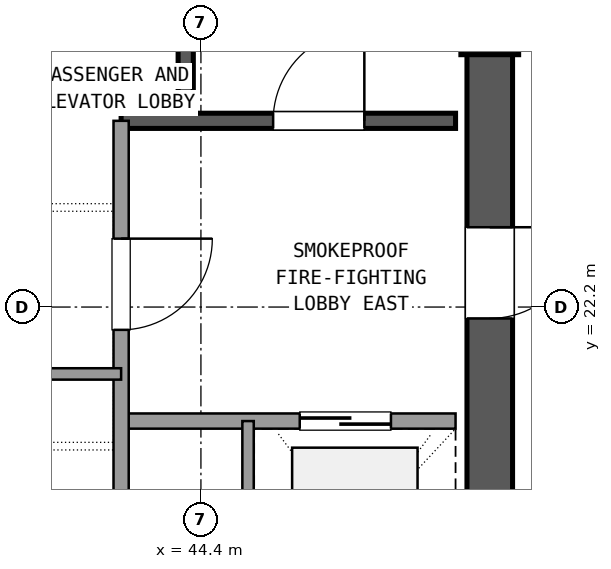
"""IFC4 building model, lengths in metres.
Left out: names, types, materials, properties, quantities, classifications, styles, units other than length and angle.
Written with IfcOpenShell. Run it as: python <this file> out.ifc"""

import sys

from ifc_helpers import new_model, si_unit, direction, frame, frame_2d, origin, origin_2d, place, context, subcontext, project, spatial, rectangle, extrude, element, fill, save


model = new_model("IFC4")
c1 = context("Model", 3, precision=1e-05, world=origin(), true_north=direction((0.0, 1.0)))
c2 = subcontext(c1, "Body", "Model", "MODEL_VIEW")
j1 = project(units=[si_unit("LENGTHUNIT", "METRE"), si_unit("PLANEANGLEUNIT", "RADIAN")], contexts=[c1])
p1 = place(None, origin())
s1 = spatial("IfcSite", under=j1, at=p1, CompositionType="ELEMENT")
p2 = place(p1, origin())
s2 = spatial("IfcBuilding", under=s1, at=p2, CompositionType="ELEMENT")
p3 = place(p2, frame((0.0, 0.0, 260.82)))
s3 = spatial("IfcBuildingStorey", under=s2, at=p3, CompositionType="ELEMENT", Elevation=260.82)
p4 = place(p3, frame((48.2, 25.9, 0.0), z_axis=(0.0, 0.0, 1.0), x_axis=(1.0, 0.0, 0.0)))
e1 = element("IfcColumn", 1, at=p4, inside=s3, PredefinedType="COLUMN", context=c2, shape_type="SweptSolid", body=[
    extrude(rectangle(XDim=0.76, YDim=0.76, at=origin_2d()), origin(), (0.0, 0.0, 1.0), 3.6),
])
p5 = place(p3, frame((48.2, 17.675, 0.0), z_axis=(0.0, 0.0, 1.0), x_axis=(0.0, 1.0, 0.0)))
e2 = element("IfcWall", 2, at=p5, inside=s3, PredefinedType="SHEAR", context=c2, shape_type="SweptSolid", body=[
    extrude(rectangle(XDim=7.85, YDim=0.6, at=frame_2d((3.925, 0.0))), origin(), (0.0, 0.0, 1.0), 3.32),
])
p6 = place(p5, frame((4.375, 0.0, 0.0)))
e3 = element("IfcOpeningElement", 3, at=p6, cuts=e2, PredefinedType="OPENING", context=c2, shape_type="SweptSolid", body=[
    extrude(rectangle(XDim=1.2, YDim=2.15, at=frame_2d((0.6, 1.075))), frame((0.0, 0.31, 0.0), z_axis=(0.0, -1.0, 0.0), x_axis=(1.0, 0.0, 0.0)), (0.0, 0.0, 1.0), 0.62),
])
p7 = place(p3, frame((44.2, 24.65, 0.0), z_axis=(0.0, 0.0, 1.0), x_axis=(0.0, 1.0, 0.0)))
e4 = element("IfcWall", 4, at=p7, inside=s3, PredefinedType="SHEAR", context=c2, shape_type="SweptSolid", body=[
    extrude(rectangle(XDim=9.4, YDim=0.2, at=frame_2d((4.7, 0.0))), origin(), (0.0, 0.0, 1.0), 3.32),
])
p8 = place(p3, frame((43.35, 24.65, 0.0), z_axis=(0.0, 0.0, 1.0), x_axis=(1.0, 0.0, 0.0)))
e5 = element("IfcWall", 5, at=p8, inside=s3, PredefinedType="SHEAR", context=c2, shape_type="SweptSolid", body=[
    extrude(rectangle(XDim=4.4, YDim=0.2, at=frame_2d((2.2, 0.0))), origin(), (0.0, 0.0, 1.0), 3.32),
])
p9 = place(p8, frame((2.0, 0.0, 0.0)))
e6 = element("IfcOpeningElement", 6, at=p9, cuts=e5, PredefinedType="OPENING", context=c2, shape_type="SweptSolid", body=[
    extrude(rectangle(XDim=1.2, YDim=2.15, at=frame_2d((0.6, 1.075))), frame((0.0, 0.11, 0.0), z_axis=(0.0, -1.0, 0.0), x_axis=(1.0, 0.0, 0.0)), (0.0, 0.0, 1.0), 0.22),
])
p10 = place(p3, frame((43.35, 20.7, 0.0), z_axis=(0.0, 0.0, 1.0), x_axis=(1.0, 0.0, 0.0)))
e7 = element("IfcWall", 7, at=p10, inside=s3, PredefinedType="SOLIDWALL", context=c2, shape_type="SweptSolid", body=[
    extrude(rectangle(XDim=4.4, YDim=0.2, at=frame_2d((2.2, 0.0))), origin(), (0.0, 0.0, 1.0), 2.61),
])
p11 = place(p10, frame((2.35, 0.0, 0.0)))
e8 = element("IfcOpeningElement", 8, at=p11, cuts=e7, PredefinedType="OPENING", context=c2, shape_type="SweptSolid", body=[
    extrude(rectangle(XDim=1.2, YDim=2.15, at=frame_2d((0.6, 1.075))), frame((0.0, 0.11, 0.0), z_axis=(0.0, -1.0, 0.0), x_axis=(1.0, 0.0, 0.0)), (0.0, 0.0, 1.0), 0.22),
])
p12 = place(p3, frame((43.35, 17.75, 0.0), z_axis=(0.0, 0.0, 1.0), x_axis=(0.0, 1.0, 0.0)))
e9 = element("IfcWall", 9, at=p12, inside=s3, PredefinedType="SOLIDWALL", context=c2, shape_type="SweptSolid", body=[
    extrude(rectangle(XDim=6.9, YDim=0.2, at=frame_2d((3.45, 0.0))), origin(), (0.0, 0.0, 1.0), 2.61),
])
p13 = place(p12, frame((4.15, 0.0, 0.0)))
e10 = element("IfcOpeningElement", 10, at=p13, cuts=e9, PredefinedType="OPENING", context=c2, shape_type="SweptSolid", body=[
    extrude(rectangle(XDim=1.2, YDim=2.15, at=frame_2d((0.6, 1.075))), frame((0.0, 0.11, 0.0), z_axis=(0.0, -1.0, 0.0), x_axis=(1.0, 0.0, 0.0)), (0.0, 0.0, 1.0), 0.22),
])
p14 = place(p3, frame((45.02, 17.75, 0.0), z_axis=(0.0, 0.0, 1.0), x_axis=(0.0, 1.0, 0.0)))
e11 = element("IfcWall", 11, at=p14, inside=s3, PredefinedType="PARTITIONING", context=c2, shape_type="SweptSolid", body=[
    extrude(rectangle(XDim=2.95, YDim=0.15, at=frame_2d((1.475, 0.0))), origin(), (0.0, 0.0, 1.0), 2.61),
])
p15 = place(p3, frame((37.25, 21.32, 0.0), z_axis=(0.0, 0.0, 1.0), x_axis=(1.0, 0.0, 0.0)))
e12 = element("IfcWall", 12, at=p15, inside=s3, PredefinedType="PARTITIONING", context=c2, shape_type="SweptSolid", body=[
    extrude(rectangle(XDim=6.1, YDim=0.15, at=frame_2d((3.05, 0.0))), origin(), (0.0, 0.0, 1.0), 2.61),
])
p16 = place(p15, frame((0.55, 0.0, 0.0)))
e13 = element("IfcOpeningElement", 13, at=p16, cuts=e12, PredefinedType="OPENING", context=c2, shape_type="SweptSolid", body=[
    extrude(rectangle(XDim=1.0, YDim=2.15, at=frame_2d((0.5, 1.075))), frame((0.0, 0.085, 0.0), z_axis=(0.0, -1.0, 0.0), x_axis=(1.0, 0.0, 0.0)), (0.0, 0.0, 1.0), 0.17),
])
p17 = place(p15, frame((3.15, 0.0, 0.0)))
e14 = element("IfcOpeningElement", 14, at=p17, cuts=e12, PredefinedType="OPENING", context=c2, shape_type="SweptSolid", body=[
    extrude(rectangle(XDim=1.0, YDim=2.15, at=frame_2d((0.5, 1.075))), frame((0.0, 0.085, 0.0), z_axis=(0.0, -1.0, 0.0), x_axis=(1.0, 0.0, 0.0)), (0.0, 0.0, 1.0), 0.17),
])
p18 = place(p9, origin())
e15 = element("IfcDoor", 15, at=p18, inside=s3, OperationType="SINGLE_SWING_RIGHT", PredefinedType="DOOR", context=c2, shape_type="SweptSolid", body=[
    extrude(rectangle(XDim=1.2, YDim=2.15, at=frame_2d((0.6, 1.075))), frame((0.0, 0.025, 0.0), z_axis=(0.0, -1.0, 0.0), x_axis=(1.0, 0.0, 0.0)), (0.0, 0.0, 1.0), 0.05),
])
fill(e6, e15)
p19 = place(p11, origin())
e16 = element("IfcDoor", 16, at=p19, inside=s3, OperationType="SLIDING_TO_RIGHT", PredefinedType="DOOR", context=c2, shape_type="SweptSolid", body=[
    extrude(rectangle(XDim=1.2, YDim=2.15, at=frame_2d((0.6, 1.075))), frame((0.0, 0.025, 0.0), z_axis=(0.0, -1.0, 0.0), x_axis=(1.0, 0.0, 0.0)), (0.0, 0.0, 1.0), 0.05),
])
fill(e8, e16)
p20 = place(p13, frame((1.2, 0.0, 0.0), z_axis=(0.0, 0.0, 1.0), x_axis=(-1.0, 0.0, 0.0)))
e17 = element("IfcDoor", 17, at=p20, inside=s3, OperationType="SINGLE_SWING_RIGHT", PredefinedType="DOOR", context=c2, shape_type="SweptSolid", body=[
    extrude(rectangle(XDim=1.2, YDim=2.15, at=frame_2d((0.6, 1.075))), frame((0.0, 0.025, 0.0), z_axis=(0.0, -1.0, 0.0), x_axis=(1.0, 0.0, 0.0)), (0.0, 0.0, 1.0), 0.05),
])
fill(e10, e17)
p21 = place(p6, frame((1.2, 0.0, 0.0), z_axis=(0.0, 0.0, 1.0), x_axis=(-1.0, 0.0, 0.0)))
e18 = element("IfcDoor", 18, at=p21, inside=s3, OperationType="SINGLE_SWING_RIGHT", PredefinedType="DOOR", context=c2, shape_type="SweptSolid", body=[
    extrude(rectangle(XDim=1.2, YDim=2.15, at=frame_2d((0.6, 1.075))), frame((0.0, 0.025, 0.0), z_axis=(0.0, -1.0, 0.0), x_axis=(1.0, 0.0, 0.0)), (0.0, 0.0, 1.0), 0.05),
])
fill(e3, e18)
save(model, sys.argv[1])
